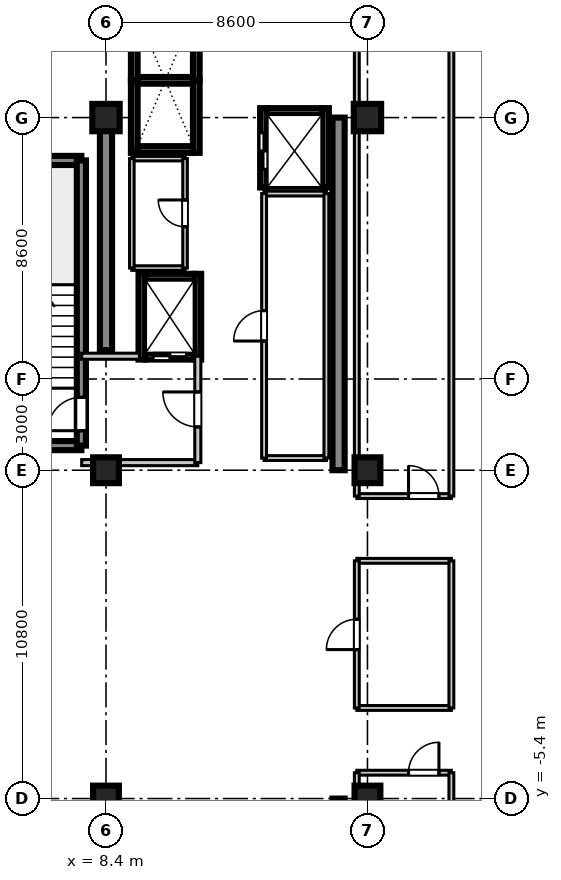
"""IFC4 building model, lengths in metres.
Left out: names, types, materials, properties, quantities, classifications, styles, units other than length and angle.
Written with IfcOpenShell. Run it as: python <this file> out.ifc"""

import sys

from ifc_helpers import new_model, si_unit, direction, frame, frame_2d, origin, origin_2d, place, context, subcontext, project, spatial, rectangle, extrude, source, transform, mapped, element, fill, save


model = new_model("IFC4")
c1 = context("Model", 3, precision=1e-05, world=origin(), true_north=direction((0.0, 1.0)))
c2 = subcontext(c1, "Body", "Model", "MODEL_VIEW")
j1 = project(units=[si_unit("LENGTHUNIT", "METRE"), si_unit("PLANEANGLEUNIT", "RADIAN")], contexts=[c1])
p1 = place(None, origin())
s1 = spatial("IfcSite", under=j1, at=p1, CompositionType="ELEMENT")
p2 = place(p1, origin())
s2 = spatial("IfcBuilding", under=s1, at=p2, CompositionType="ELEMENT")
p3 = place(p2, frame((0.0, 0.0, 319.55)))
s3 = spatial("IfcBuildingStorey", under=s2, at=p3, CompositionType="ELEMENT", Elevation=319.55)
m1 = source(origin(), c2, "Body", "SweptSolid", [
    extrude(rectangle(XDim=0.85, YDim=0.85, at=origin_2d()), origin(), (0.0, 0.0, 1.0), 3.755),
])
for number, where, z_axis, x_axis in (
    (1, (8.4, -5.4, 0.0), (0.0, 0.0, 1.0), (1.0, 0.0, 0.0)),
    (2, (8.4, 5.4, 0.0), (0.0, 0.0, 1.0), (1.0, 0.0, 0.0)),
):
    element("IfcColumn", number, at=place(p3, frame(where, z_axis=z_axis, x_axis=x_axis)), inside=s3, PredefinedType="PILASTER", context=c2, shape_type="MappedRepresentation", body=[
        mapped(m1, transform((0.0, 0.0, 0.0), scale=1.0)),
    ])
m2 = source(origin(), c2, "Body", "SweptSolid", [
    extrude(rectangle(XDim=0.9, YDim=0.9, at=origin_2d()), origin(), (0.0, 0.0, 1.0), 3.755),
])
p4 = place(p3, frame((8.4, 17.0, 0.0), z_axis=(0.0, 0.0, 1.0), x_axis=(1.0, 0.0, 0.0)))
e3 = element("IfcColumn", 3, at=p4, inside=s3, PredefinedType="COLUMN", context=c2, shape_type="MappedRepresentation", body=[
    mapped(m2, transform((0.0, 0.0, 0.0), scale=1.0)),
])
for number, where, z_axis, x_axis in (
    (4, (17.0, -5.4, 0.0), (0.0, 0.0, 1.0), (1.0, 0.0, 0.0)),
    (5, (17.0, 5.4, 0.0), (0.0, 0.0, 1.0), (1.0, 0.0, 0.0)),
):
    element("IfcColumn", number, at=place(p3, frame(where, z_axis=z_axis, x_axis=x_axis)), inside=s3, PredefinedType="PILASTER", context=c2, shape_type="MappedRepresentation", body=[
        mapped(m1, transform((0.0, 0.0, 0.0), scale=1.0)),
    ])
p5 = place(p3, frame((17.0, 17.0, 0.0), z_axis=(0.0, 0.0, 1.0), x_axis=(1.0, 0.0, 0.0)))
e6 = element("IfcColumn", 6, at=p5, inside=s3, PredefinedType="COLUMN", context=c2, shape_type="MappedRepresentation", body=[
    mapped(m2, transform((0.0, 0.0, 0.0), scale=1.0)),
])
m3 = source(origin(), c2, "Body", "SweptSolid", [
    extrude(rectangle(XDim=7.65, YDim=0.4, at=frame_2d((3.825, 0.0))), origin(), (0.0, 0.0, 1.0), 3.5),
])
p6 = place(p3, frame((8.4, 9.35, 0.0), z_axis=(0.0, 0.0, 1.0), x_axis=(0.0, 1.0, 0.0)))
e7 = element("IfcWall", 7, at=p6, inside=s3, PredefinedType="SHEAR", context=c2, shape_type="MappedRepresentation", body=[
    mapped(m3, transform((0.0, 0.0, 0.0), scale=1.0)),
])
m4 = source(origin(), c2, "Body", "SweptSolid", [
    extrude(rectangle(XDim=11.6, YDim=0.4, at=frame_2d((5.8, 0.0))), origin(), (0.0, 0.0, 1.0), 3.5),
])
for number, where, z_axis, x_axis in (
    (8, (16.05, 5.4, 0.0), (0.0, 0.0, 1.0), (0.0, 1.0, 0.0)),
    (9, (16.05, -17.0, 0.0), (0.0, 0.0, 1.0), (0.0, 1.0, 0.0)),
):
    element("IfcWall", number, at=place(p3, frame(where, z_axis=z_axis, x_axis=x_axis)), inside=s3, PredefinedType="SHEAR", context=c2, shape_type="MappedRepresentation", body=[
        mapped(m4, transform((0.0, 0.0, 0.0), scale=1.0)),
    ])
m5 = source(origin(), c2, "Body", "SweptSolid", [
    extrude(rectangle(XDim=3.98, YDim=0.3, at=frame_2d((1.99, 0.0))), origin(), (0.0, 0.0, 1.0), 3.5),
])
for number, where, z_axis, x_axis in (
    (10, (3.61, 6.21, 0.0), (0.0, 0.0, 1.0), (1.0, 0.0, 0.0)),
    (11, (3.61, 15.59, 0.0), (0.0, 0.0, 1.0), (1.0, 0.0, 0.0)),
):
    element("IfcWall", number, at=place(p3, frame(where, z_axis=z_axis, x_axis=x_axis)), inside=s3, PredefinedType="SHEAR", context=c2, shape_type="MappedRepresentation", body=[
        mapped(m5, transform((0.0, 0.0, 0.0), scale=1.0)),
    ])
m6 = source(origin(), c2, "Body", "SweptSolid", [
    extrude(rectangle(XDim=9.38, YDim=0.3, at=frame_2d((4.69, 0.0))), origin(), (0.0, 0.0, 1.0), 3.5),
])
p7 = place(p3, frame((7.59, 6.21, 0.0), z_axis=(0.0, 0.0, 1.0), x_axis=(0.0, 1.0, 0.0)))
e12 = element("IfcWall", 12, at=p7, inside=s3, PredefinedType="SHEAR", context=c2, shape_type="MappedRepresentation", body=[
    mapped(m6, transform((0.0, 0.0, 0.0), scale=1.0)),
])
p8 = place(p7, frame((0.49, 0.0, 0.0)))
e13 = element("IfcOpeningElement", 13, at=p8, cuts=e12, PredefinedType="OPENING", context=c2, shape_type="SweptSolid", body=[
    extrude(rectangle(XDim=1.1, YDim=2.15, at=frame_2d((0.55, 1.075))), frame((0.0, 0.16, 0.0), z_axis=(0.0, -1.0, 0.0), x_axis=(1.0, 0.0, 0.0)), (0.0, 0.0, 1.0), 0.32),
])
m7 = source(origin(), c2, "Body", "SweptSolid", [
    extrude(rectangle(XDim=2.385, YDim=0.22, at=frame_2d((1.192, 0.0))), origin(), (0.0, 0.0, 1.0), 3.5),
])
for number, where, z_axis, x_axis in (
    (14, (9.33, 15.84, 0.0), (0.0, 0.0, 1.0), (0.0, 1.0, 0.0)),
    (15, (11.37, 15.84, 0.0), (0.0, 0.0, 1.0), (0.0, 1.0, 0.0)),
):
    element("IfcWall", number, at=place(p3, frame(where, z_axis=z_axis, x_axis=x_axis)), inside=s3, PredefinedType="SHEAR", context=c2, shape_type="MappedRepresentation", body=[
        mapped(m7, transform((0.0, 0.0, 0.0), scale=1.0)),
    ])
m8 = source(origin(), c2, "Body", "SweptSolid", [
    extrude(rectangle(XDim=1.82, YDim=0.22, at=frame_2d((0.91, 0.0))), origin(), (0.0, 0.0, 1.0), 3.5),
])
p9 = place(p3, frame((9.44, 15.95, 0.0), z_axis=(0.0, 0.0, 1.0), x_axis=(1.0, 0.0, 0.0)))
e16 = element("IfcWall", 16, at=p9, inside=s3, PredefinedType="SHEAR", context=c2, shape_type="MappedRepresentation", body=[
    mapped(m8, transform((0.0, 0.0, 0.0), scale=1.0)),
])
m9 = source(origin(), c2, "Body", "SweptSolid", [
    extrude(rectangle(XDim=1.82, YDim=0.22, at=frame_2d((0.91, 0.0))), origin(), (0.0, 0.0, 1.0), 3.8),
])
p10 = place(p3, frame((9.44, 18.225, 0.0), z_axis=(0.0, 0.0, 1.0), x_axis=(1.0, 0.0, 0.0)))
e17 = element("IfcWall", 17, at=p10, inside=s3, PredefinedType="SHEAR", context=c2, shape_type="MappedRepresentation", body=[
    mapped(m9, transform((0.0, 0.0, 0.0), scale=1.0)),
])
for number, where, z_axis, x_axis in (
    (18, (9.33, 18.225, 0.0), (0.0, 0.0, 1.0), (0.0, 1.0, 0.0)),
    (19, (11.37, 18.225, 0.0), (0.0, 0.0, 1.0), (0.0, 1.0, 0.0)),
):
    element("IfcWall", number, at=place(p3, frame(where, z_axis=z_axis, x_axis=x_axis)), inside=s3, PredefinedType="SHEAR", context=c2, shape_type="MappedRepresentation", body=[
        mapped(m7, transform((0.0, 0.0, 0.0), scale=1.0)),
    ])
m10 = source(origin(), c2, "Body", "SweptSolid", [
    extrude(rectangle(XDim=2.82, YDim=0.22, at=frame_2d((1.41, 0.0))), origin(), (0.0, 0.0, 1.0), 3.5),
])
for number, where, z_axis, x_axis in (
    (20, (9.58, 9.04, 0.0), (0.0, 0.0, 1.0), (0.0, 1.0, 0.0)),
    (21, (11.42, 9.04, 0.0), (0.0, 0.0, 1.0), (0.0, 1.0, 0.0)),
):
    element("IfcWall", number, at=place(p3, frame(where, z_axis=z_axis, x_axis=x_axis)), inside=s3, PredefinedType="SHEAR", context=c2, shape_type="MappedRepresentation", body=[
        mapped(m10, transform((0.0, 0.0, 0.0), scale=1.0)),
    ])
m11 = source(origin(), c2, "Body", "SweptSolid", [
    extrude(rectangle(XDim=1.62, YDim=0.22, at=frame_2d((0.81, 0.0))), origin(), (0.0, 0.0, 1.0), 3.5),
])
p11 = place(p3, frame((9.69, 9.15, 0.0), z_axis=(0.0, 0.0, 1.0), x_axis=(1.0, 0.0, 0.0)))
e22 = element("IfcWall", 22, at=p11, inside=s3, PredefinedType="SHEAR", context=c2, shape_type="MappedRepresentation", body=[
    mapped(m11, transform((0.0, 0.0, 0.0), scale=1.0)),
])
p12 = place(p11, frame((0.26, 0.0, 0.0)))
e23 = element("IfcOpeningElement", 23, at=p12, cuts=e22, PredefinedType="OPENING", context=c2, shape_type="SweptSolid", body=[
    extrude(rectangle(XDim=1.1, YDim=2.2, at=frame_2d((0.55, 1.1))), frame((0.0, 0.12, 0.0), z_axis=(0.0, -1.0, 0.0), x_axis=(1.0, 0.0, 0.0)), (0.0, 0.0, 1.0), 0.24),
])
p13 = place(p3, frame((9.69, 11.75, 0.0), z_axis=(0.0, 0.0, 1.0), x_axis=(1.0, 0.0, 0.0)))
e24 = element("IfcWall", 24, at=p13, inside=s3, PredefinedType="SHEAR", context=c2, shape_type="MappedRepresentation", body=[
    mapped(m11, transform((0.0, 0.0, 0.0), scale=1.0)),
])
m12 = source(origin(), c2, "Body", "SweptSolid", [
    extrude(rectangle(XDim=2.61, YDim=0.22, at=frame_2d((1.305, 0.0))), origin(), (0.0, 0.0, 1.0), 3.5),
])
p14 = place(p3, frame((13.58, 14.7, 0.0), z_axis=(0.0, 0.0, 1.0), x_axis=(0.0, 1.0, 0.0)))
e25 = element("IfcWall", 25, at=p14, inside=s3, PredefinedType="SHEAR", context=c2, shape_type="MappedRepresentation", body=[
    mapped(m12, transform((0.0, 0.0, 0.0), scale=1.0)),
])
p15 = place(p14, frame((0.6, 0.0, 0.0)))
e26 = element("IfcOpeningElement", 26, at=p15, cuts=e25, PredefinedType="OPENING", context=c2, shape_type="SweptSolid", body=[
    extrude(rectangle(XDim=1.2, YDim=2.2, at=frame_2d((0.6, 1.1))), frame((0.0, 0.12, 0.0), z_axis=(0.0, -1.0, 0.0), x_axis=(1.0, 0.0, 0.0)), (0.0, 0.0, 1.0), 0.24),
])
p16 = place(p3, frame((15.62, 14.7, 0.0), z_axis=(0.0, 0.0, 1.0), x_axis=(0.0, 1.0, 0.0)))
e27 = element("IfcWall", 27, at=p16, inside=s3, PredefinedType="SHEAR", context=c2, shape_type="MappedRepresentation", body=[
    mapped(m12, transform((0.0, 0.0, 0.0), scale=1.0)),
])
p17 = place(p3, frame((13.69, 17.2, 0.0), z_axis=(0.0, 0.0, 1.0), x_axis=(1.0, 0.0, 0.0)))
e28 = element("IfcWall", 28, at=p17, inside=s3, PredefinedType="SHEAR", context=c2, shape_type="MappedRepresentation", body=[
    mapped(m8, transform((0.0, 0.0, 0.0), scale=1.0)),
])
m13 = source(origin(), c2, "Body", "SweptSolid", [
    extrude(rectangle(XDim=3.82, YDim=0.2, at=frame_2d((1.91, 0.0))), origin(), (0.0, 0.0, 1.0), 2.84),
])
p18 = place(p3, frame((7.6, 5.65, 0.0), z_axis=(0.0, 0.0, 1.0), x_axis=(1.0, 0.0, 0.0)))
e29 = element("IfcWall", 29, at=p18, inside=s3, PredefinedType="PARTITIONING", context=c2, shape_type="MappedRepresentation", body=[
    mapped(m13, transform((0.0, 0.0, 0.0), scale=1.0)),
])
m14 = source(origin(), c2, "Body", "SweptSolid", [
    extrude(rectangle(XDim=1.9, YDim=0.2, at=frame_2d((0.95, 0.0))), origin(), (0.0, 0.0, 1.0), 2.84),
])
p19 = place(p3, frame((7.6, 9.15, 0.0), z_axis=(0.0, 0.0, 1.0), x_axis=(1.0, 0.0, 0.0)))
e30 = element("IfcWall", 30, at=p19, inside=s3, PredefinedType="PARTITIONING", context=c2, shape_type="MappedRepresentation", body=[
    mapped(m14, transform((0.0, 0.0, 0.0), scale=1.0)),
])
m15 = source(origin(), c2, "Body", "SweptSolid", [
    extrude(rectangle(XDim=3.5, YDim=0.2, at=frame_2d((1.75, 0.0))), origin(), (0.0, 0.0, 1.0), 2.84),
])
p20 = place(p3, frame((11.42, 5.65, 0.0), z_axis=(0.0, 0.0, 1.0), x_axis=(0.0, 1.0, 0.0)))
e31 = element("IfcWall", 31, at=p20, inside=s3, PredefinedType="PARTITIONING", context=c2, shape_type="MappedRepresentation", body=[
    mapped(m15, transform((0.0, 0.0, 0.0), scale=1.0)),
])
p21 = place(p20, frame((1.175, 0.0, 0.0)))
e32 = element("IfcOpeningElement", 32, at=p21, cuts=e31, PredefinedType="OPENING", context=c2, shape_type="SweptSolid", body=[
    extrude(rectangle(XDim=1.15, YDim=2.15, at=frame_2d((0.575, 1.075))), frame((0.0, 0.11, 0.0), z_axis=(0.0, -1.0, 0.0), x_axis=(1.0, 0.0, 0.0)), (0.0, 0.0, 1.0), 0.22),
])
m16 = source(origin(), c2, "Body", "SweptSolid", [
    extrude(rectangle(XDim=1.75, YDim=0.15, at=frame_2d((0.875, 0.0))), origin(), (0.0, 0.0, 1.0), 2.84),
])
for number, where, z_axis, x_axis in (
    (33, (9.25, 12.05, 0.0), (0.0, 0.0, 1.0), (1.0, 0.0, 0.0)),
    (34, (9.25, 15.65, 0.0), (0.0, 0.0, 1.0), (1.0, 0.0, 0.0)),
):
    element("IfcWall", number, at=place(p3, frame(where, z_axis=z_axis, x_axis=x_axis)), inside=s3, PredefinedType="PARTITIONING", context=c2, shape_type="MappedRepresentation", body=[
        mapped(m16, transform((0.0, 0.0, 0.0), scale=1.0)),
    ])
m17 = source(origin(), c2, "Body", "SweptSolid", [
    extrude(rectangle(XDim=3.6, YDim=0.15, at=frame_2d((1.8, 0.0))), origin(), (0.0, 0.0, 1.0), 2.84),
])
p22 = place(p3, frame((9.25, 12.05, 0.0), z_axis=(0.0, 0.0, 1.0), x_axis=(0.0, 1.0, 0.0)))
e35 = element("IfcWall", 35, at=p22, inside=s3, PredefinedType="PARTITIONING", context=c2, shape_type="MappedRepresentation", body=[
    mapped(m17, transform((0.0, 0.0, 0.0), scale=1.0)),
])
p23 = place(p3, frame((11.0, 12.05, 0.0), z_axis=(0.0, 0.0, 1.0), x_axis=(0.0, 1.0, 0.0)))
e36 = element("IfcWall", 36, at=p23, inside=s3, PredefinedType="PARTITIONING", context=c2, shape_type="MappedRepresentation", body=[
    mapped(m17, transform((0.0, 0.0, 0.0), scale=1.0)),
])
p24 = place(p23, frame((1.36, 0.0, 0.0)))
e37 = element("IfcOpeningElement", 37, at=p24, cuts=e36, PredefinedType="OPENING", context=c2, shape_type="SweptSolid", body=[
    extrude(rectangle(XDim=0.88, YDim=2.1, at=frame_2d((0.44, 1.05))), frame((0.0, 0.085, 0.0), z_axis=(0.0, -1.0, 0.0), x_axis=(1.0, 0.0, 0.0)), (0.0, 0.0, 1.0), 0.17),
])
m18 = source(origin(), c2, "Body", "SweptSolid", [
    extrude(rectangle(XDim=2.05, YDim=0.16, at=frame_2d((1.025, 0.0))), origin(), (0.0, 0.0, 1.0), 2.84),
])
for number, where, z_axis, x_axis in (
    (38, (13.6, 5.8, 0.0), (0.0, 0.0, 1.0), (1.0, 0.0, 0.0)),
    (39, (13.6, 14.5, 0.0), (0.0, 0.0, 1.0), (1.0, 0.0, 0.0)),
):
    element("IfcWall", number, at=place(p3, frame(where, z_axis=z_axis, x_axis=x_axis)), inside=s3, PredefinedType="PARTITIONING", context=c2, shape_type="MappedRepresentation", body=[
        mapped(m18, transform((0.0, 0.0, 0.0), scale=1.0)),
    ])
m19 = source(origin(), c2, "Body", "SweptSolid", [
    extrude(rectangle(XDim=8.7, YDim=0.16, at=frame_2d((4.35, 0.0))), origin(), (0.0, 0.0, 1.0), 2.84),
])
p25 = place(p3, frame((13.6, 5.8, 0.0), z_axis=(0.0, 0.0, 1.0), x_axis=(0.0, 1.0, 0.0)))
e40 = element("IfcWall", 40, at=p25, inside=s3, PredefinedType="PARTITIONING", context=c2, shape_type="MappedRepresentation", body=[
    mapped(m19, transform((0.0, 0.0, 0.0), scale=1.0)),
])
p26 = place(p25, frame((3.85, 0.0, 0.0)))
e41 = element("IfcOpeningElement", 41, at=p26, cuts=e40, PredefinedType="OPENING", context=c2, shape_type="SweptSolid", body=[
    extrude(rectangle(XDim=1.0, YDim=2.1, at=frame_2d((0.5, 1.05))), frame((0.0, 0.09, 0.0), z_axis=(0.0, -1.0, 0.0), x_axis=(1.0, 0.0, 0.0)), (0.0, 0.0, 1.0), 0.18),
])
p27 = place(p3, frame((15.65, 5.8, 0.0), z_axis=(0.0, 0.0, 1.0), x_axis=(0.0, 1.0, 0.0)))
e42 = element("IfcWall", 42, at=p27, inside=s3, PredefinedType="PARTITIONING", context=c2, shape_type="MappedRepresentation", body=[
    mapped(m19, transform((0.0, 0.0, 0.0), scale=1.0)),
])
m20 = source(origin(), c2, "Body", "SweptSolid", [
    extrude(rectangle(XDim=3.11, YDim=0.16, at=frame_2d((1.555, 0.0))), origin(), (0.0, 0.0, 1.0), 2.84),
])
p28 = place(p3, frame((16.65, 4.55, 0.0), z_axis=(0.0, 0.0, 1.0), x_axis=(1.0, 0.0, 0.0)))
e43 = element("IfcWall", 43, at=p28, inside=s3, PredefinedType="PARTITIONING", context=c2, shape_type="MappedRepresentation", body=[
    mapped(m20, transform((0.0, 0.0, 0.0), scale=1.0)),
])
p29 = place(p28, frame((1.701, 0.0, 0.0)))
e44 = element("IfcOpeningElement", 44, at=p29, cuts=e43, PredefinedType="OPENING", context=c2, shape_type="SweptSolid", body=[
    extrude(rectangle(XDim=1.0, YDim=2.1, at=frame_2d((0.5, 1.05))), frame((0.0, 0.09, 0.0), z_axis=(0.0, -1.0, 0.0), x_axis=(1.0, 0.0, 0.0)), (0.0, 0.0, 1.0), 0.18),
])
m21 = source(origin(), c2, "Body", "SweptSolid", [
    extrude(rectangle(XDim=17.95, YDim=0.16, at=frame_2d((8.975, 0.0))), origin(), (0.0, 0.0, 1.0), 2.84),
])
p30 = place(p3, frame((16.65, 4.55, 0.0), z_axis=(0.0, 0.0, 1.0), x_axis=(0.0, 1.0, 0.0)))
e45 = element("IfcWall", 45, at=p30, inside=s3, PredefinedType="PARTITIONING", context=c2, shape_type="MappedRepresentation", body=[
    mapped(m21, transform((0.0, 0.0, 0.0), scale=1.0)),
])
m22 = source(origin(), c2, "Body", "SweptSolid", [
    extrude(rectangle(XDim=16.53, YDim=0.16, at=frame_2d((8.265, 0.0))), origin(), (0.0, 0.0, 1.0), 2.84),
])
p31 = place(p3, frame((19.76, 4.55, 0.0), z_axis=(0.0, 0.0, 1.0), x_axis=(0.0, 1.0, 0.0)))
e46 = element("IfcWall", 46, at=p31, inside=s3, PredefinedType="PARTITIONING", context=c2, shape_type="MappedRepresentation", body=[
    mapped(m22, transform((0.0, 0.0, 0.0), scale=1.0)),
])
p32 = place(p3, frame((16.65, -4.55, 0.0), z_axis=(0.0, 0.0, 1.0), x_axis=(1.0, 0.0, 0.0)))
e47 = element("IfcWall", 47, at=p32, inside=s3, PredefinedType="PARTITIONING", context=c2, shape_type="MappedRepresentation", body=[
    mapped(m20, transform((0.0, 0.0, 0.0), scale=1.0)),
])
p33 = place(p32, frame((1.701, 0.0, 0.0)))
e48 = element("IfcOpeningElement", 48, at=p33, cuts=e47, PredefinedType="OPENING", context=c2, shape_type="SweptSolid", body=[
    extrude(rectangle(XDim=1.0, YDim=2.1, at=frame_2d((0.5, 1.05))), frame((0.0, 0.09, 0.0), z_axis=(0.0, -1.0, 0.0), x_axis=(1.0, 0.0, 0.0)), (0.0, 0.0, 1.0), 0.18),
])
p34 = place(p3, frame((16.65, -22.5, 0.0), z_axis=(0.0, 0.0, 1.0), x_axis=(0.0, 1.0, 0.0)))
e49 = element("IfcWall", 49, at=p34, inside=s3, PredefinedType="PARTITIONING", context=c2, shape_type="MappedRepresentation", body=[
    mapped(m21, transform((0.0, 0.0, 0.0), scale=1.0)),
])
p35 = place(p3, frame((19.76, -21.08, 0.0), z_axis=(0.0, 0.0, 1.0), x_axis=(0.0, 1.0, 0.0)))
e50 = element("IfcWall", 50, at=p35, inside=s3, PredefinedType="PARTITIONING", context=c2, shape_type="MappedRepresentation", body=[
    mapped(m22, transform((0.0, 0.0, 0.0), scale=1.0)),
])
for number, where, z_axis, x_axis in (
    (51, (16.65, -2.42, 0.0), (0.0, 0.0, 1.0), (1.0, 0.0, 0.0)),
    (52, (16.65, 2.42, 0.0), (0.0, 0.0, 1.0), (1.0, 0.0, 0.0)),
):
    element("IfcWall", number, at=place(p3, frame(where, z_axis=z_axis, x_axis=x_axis)), inside=s3, PredefinedType="PARTITIONING", context=c2, shape_type="MappedRepresentation", body=[
        mapped(m20, transform((0.0, 0.0, 0.0), scale=1.0)),
    ])
m23 = source(origin(), c2, "Body", "SweptSolid", [
    extrude(rectangle(XDim=4.84, YDim=0.16, at=frame_2d((2.42, 0.0))), origin(), (0.0, 0.0, 1.0), 2.84),
])
p36 = place(p3, frame((16.65, -2.42, 0.0), z_axis=(0.0, 0.0, 1.0), x_axis=(0.0, 1.0, 0.0)))
e53 = element("IfcWall", 53, at=p36, inside=s3, PredefinedType="PARTITIONING", context=c2, shape_type="MappedRepresentation", body=[
    mapped(m23, transform((0.0, 0.0, 0.0), scale=1.0)),
])
p37 = place(p36, frame((1.92, 0.0, 0.0)))
e54 = element("IfcOpeningElement", 54, at=p37, cuts=e53, PredefinedType="OPENING", context=c2, shape_type="SweptSolid", body=[
    extrude(rectangle(XDim=1.0, YDim=2.1, at=frame_2d((0.5, 1.05))), frame((0.0, 0.09, 0.0), z_axis=(0.0, -1.0, 0.0), x_axis=(1.0, 0.0, 0.0)), (0.0, 0.0, 1.0), 0.18),
])
p38 = place(p3, frame((19.76, -2.42, 0.0), z_axis=(0.0, 0.0, 1.0), x_axis=(0.0, 1.0, 0.0)))
e55 = element("IfcWall", 55, at=p38, inside=s3, PredefinedType="PARTITIONING", context=c2, shape_type="MappedRepresentation", body=[
    mapped(m23, transform((0.0, 0.0, 0.0), scale=1.0)),
])
m24 = source(origin(), c2, "Body", "SweptSolid", [
    extrude(rectangle(XDim=1.1, YDim=2.15, at=frame_2d((0.55, 1.075))), frame((0.0, 0.025, 0.0), z_axis=(0.0, -1.0, 0.0), x_axis=(1.0, 0.0, 0.0)), (0.0, 0.0, 1.0), 0.05),
])
p39 = place(p8, origin())
e56 = element("IfcDoor", 56, at=p39, inside=s3, OperationType="SINGLE_SWING_LEFT", PredefinedType="DOOR", context=c2, shape_type="MappedRepresentation", body=[
    mapped(m24, transform((0.0, 0.0, 0.0), scale=1.0)),
])
fill(e13, e56)
m25 = source(origin(), c2, "Body", "SweptSolid", [
    extrude(rectangle(XDim=1.1, YDim=2.2, at=frame_2d((0.55, 1.1))), frame((0.0, 0.025, 0.0), z_axis=(0.0, -1.0, 0.0), x_axis=(1.0, 0.0, 0.0)), (0.0, 0.0, 1.0), 0.05),
])
p40 = place(p12, frame((1.1, 0.0, 0.0), z_axis=(0.0, 0.0, 1.0), x_axis=(-1.0, 0.0, 0.0)))
e57 = element("IfcDoor", 57, at=p40, inside=s3, OperationType="DOUBLE_DOOR_SLIDING", PredefinedType="DOOR", context=c2, shape_type="MappedRepresentation", body=[
    mapped(m25, transform((0.0, 0.0, 0.0), scale=1.0)),
])
fill(e23, e57)
m26 = source(origin(), c2, "Body", "SweptSolid", [
    extrude(rectangle(XDim=1.2, YDim=2.2, at=frame_2d((0.6, 1.1))), frame((0.0, 0.025, 0.0), z_axis=(0.0, -1.0, 0.0), x_axis=(1.0, 0.0, 0.0)), (0.0, 0.0, 1.0), 0.05),
])
p41 = place(p15, origin())
e58 = element("IfcDoor", 58, at=p41, inside=s3, OperationType="DOUBLE_DOOR_SLIDING", PredefinedType="DOOR", context=c2, shape_type="MappedRepresentation", body=[
    mapped(m26, transform((0.0, 0.0, 0.0), scale=1.0)),
])
fill(e26, e58)
m27 = source(origin(), c2, "Body", "SweptSolid", [
    extrude(rectangle(XDim=1.15, YDim=2.15, at=frame_2d((0.575, 1.075))), frame((0.0, 0.025, 0.0), z_axis=(0.0, -1.0, 0.0), x_axis=(1.0, 0.0, 0.0)), (0.0, 0.0, 1.0), 0.05),
])
p42 = place(p21, frame((1.15, 0.0, 0.0), z_axis=(0.0, 0.0, 1.0), x_axis=(-1.0, 0.0, 0.0)))
e59 = element("IfcDoor", 59, at=p42, inside=s3, OperationType="SINGLE_SWING_RIGHT", PredefinedType="DOOR", context=c2, shape_type="MappedRepresentation", body=[
    mapped(m27, transform((0.0, 0.0, 0.0), scale=1.0)),
])
fill(e32, e59)
m28 = source(origin(), c2, "Body", "SweptSolid", [
    extrude(rectangle(XDim=0.88, YDim=2.1, at=frame_2d((0.44, 1.05))), frame((0.0, 0.025, 0.0), z_axis=(0.0, -1.0, 0.0), x_axis=(1.0, 0.0, 0.0)), (0.0, 0.0, 1.0), 0.05),
])
p43 = place(p24, origin())
e60 = element("IfcDoor", 60, at=p43, inside=s3, OperationType="SINGLE_SWING_RIGHT", PredefinedType="DOOR", context=c2, shape_type="MappedRepresentation", body=[
    mapped(m28, transform((0.0, 0.0, 0.0), scale=1.0)),
])
fill(e37, e60)
m29 = source(origin(), c2, "Body", "SweptSolid", [
    extrude(rectangle(XDim=1.0, YDim=2.1, at=frame_2d((0.5, 1.05))), frame((0.0, 0.025, 0.0), z_axis=(0.0, -1.0, 0.0), x_axis=(1.0, 0.0, 0.0)), (0.0, 0.0, 1.0), 0.05),
])
p44 = place(p26, frame((1.0, 0.0, 0.0), z_axis=(0.0, 0.0, 1.0), x_axis=(-1.0, 0.0, 0.0)))
e61 = element("IfcDoor", 61, at=p44, inside=s3, OperationType="SINGLE_SWING_LEFT", PredefinedType="DOOR", context=c2, shape_type="MappedRepresentation", body=[
    mapped(m29, transform((0.0, 0.0, 0.0), scale=1.0)),
])
fill(e41, e61)
p45 = place(p29, origin())
e62 = element("IfcDoor", 62, at=p45, inside=s3, OperationType="SINGLE_SWING_LEFT", PredefinedType="DOOR", context=c2, shape_type="MappedRepresentation", body=[
    mapped(m29, transform((0.0, 0.0, 0.0), scale=1.0)),
])
fill(e44, e62)
p46 = place(p33, frame((1.0, 0.0, 0.0), z_axis=(0.0, 0.0, 1.0), x_axis=(-1.0, 0.0, 0.0)))
e63 = element("IfcDoor", 63, at=p46, inside=s3, OperationType="SINGLE_SWING_RIGHT", PredefinedType="DOOR", context=c2, shape_type="MappedRepresentation", body=[
    mapped(m29, transform((0.0, 0.0, 0.0), scale=1.0)),
])
fill(e48, e63)
p47 = place(p37, frame((1.0, 0.0, 0.0), z_axis=(0.0, 0.0, 1.0), x_axis=(-1.0, 0.0, 0.0)))
e64 = element("IfcDoor", 64, at=p47, inside=s3, OperationType="SINGLE_SWING_LEFT", PredefinedType="DOOR", context=c2, shape_type="MappedRepresentation", body=[
    mapped(m29, transform((0.0, 0.0, 0.0), scale=1.0)),
])
fill(e54, e64)
save(model, sys.argv[1])
